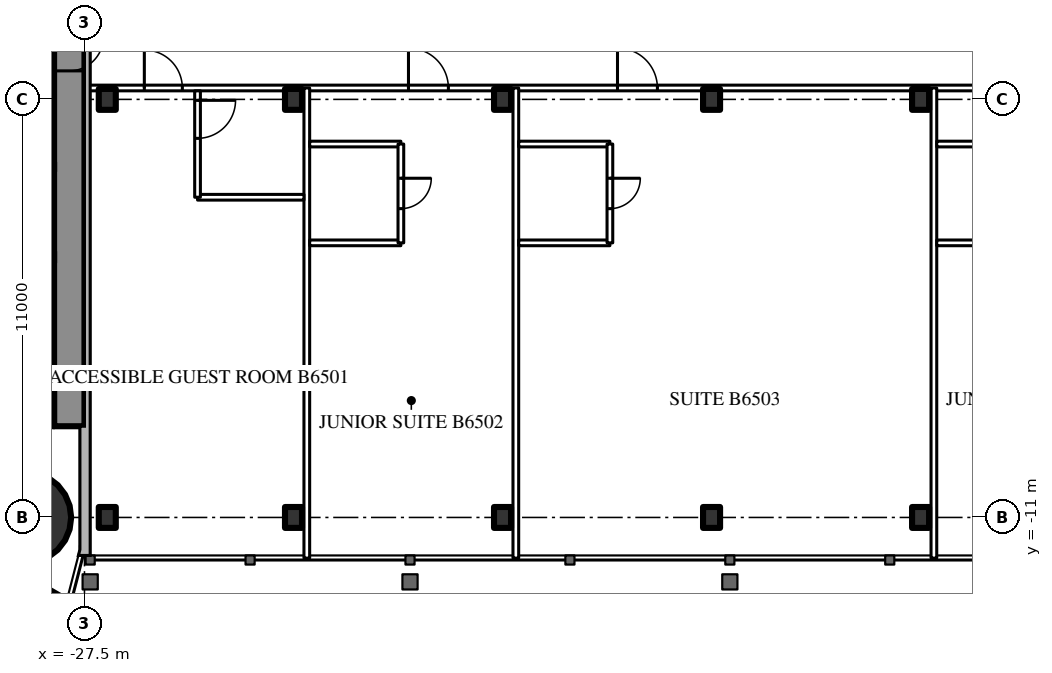
"""IFC4 building model, lengths in metres.
Left out: names, types, materials, properties, quantities, classifications, styles, units other than length and angle.
Written with IfcOpenShell. Run it as: python <this file> out.ifc"""

import sys

from ifc_helpers import new_model, si_unit, direction, frame, frame_2d, origin, origin_2d, place, context, subcontext, project, spatial, rectangle, circle, i_section, extrude, element, fill, save


model = new_model("IFC4")
c1 = context("Model", 3, precision=1e-05, world=origin(), true_north=direction((0.0, 1.0)))
c2 = subcontext(c1, "Body", "Model", "MODEL_VIEW")
j1 = project(units=[si_unit("LENGTHUNIT", "METRE"), si_unit("PLANEANGLEUNIT", "RADIAN")], contexts=[c1])
p1 = place(None, origin())
s1 = spatial("IfcSite", under=j1, at=p1, CompositionType="ELEMENT")
p2 = place(p1, origin())
s2 = spatial("IfcBuilding", under=s1, at=p2, CompositionType="ELEMENT")
p3 = place(p2, frame((0.0, 0.0, 244.1)))
s3 = spatial("IfcBuildingStorey", under=s2, at=p3, CompositionType="ELEMENT", Elevation=244.1)
p4 = place(p3, frame((-29.05, -11.0, 0.0), z_axis=(0.0, 0.0, 1.0), x_axis=(1.0, 0.0, 0.0)))
e1 = element("IfcColumn", 1, at=p4, inside=s3, PredefinedType="COLUMN", context=c2, shape_type="SweptSolid", body=[
    extrude(circle(Radius=1.2, at=origin_2d()), origin(), (0.0, 0.0, 1.0), 3.6),
])
p5 = place(p3, frame((-27.9, 8.6, 0.0), z_axis=(0.0, 0.0, 1.0), x_axis=(0.0, -1.0, 0.0)))
e2 = element("IfcWall", 2, at=p5, inside=s3, PredefinedType="SHEAR", context=c2, shape_type="SweptSolid", body=[
    extrude(rectangle(XDim=17.2, YDim=0.8, at=frame_2d((8.6, 0.0))), origin(), (0.0, 0.0, 1.0), 3.6),
])
p6 = place(p5, frame((6.95, 0.0, 0.0)))
e3 = element("IfcOpeningElement", 3, at=p6, cuts=e2, PredefinedType="OPENING", context=c2, shape_type="SweptSolid", body=[
    extrude(rectangle(XDim=0.9, YDim=2.2, at=frame_2d((0.45, 1.1))), frame((0.0, 0.41, 0.0), z_axis=(0.0, -1.0, 0.0), x_axis=(1.0, 0.0, 0.0)), (0.0, 0.0, 1.0), 0.82),
])
p7 = place(p3, frame((-28.3, -8.0, 0.0), z_axis=(0.0, 0.0, 1.0), x_axis=(-1.0, 0.0, 0.0)))
e4 = element("IfcWall", 4, at=p7, inside=s3, PredefinedType="SHEAR", context=c2, shape_type="SweptSolid", body=[
    extrude(rectangle(XDim=8.4, YDim=1.2, at=frame_2d((4.2, 0.0))), origin(), (0.0, 0.0, 1.0), 3.6),
])
p8 = place(p7, frame((0.25, 0.0, 0.0)))
e5 = element("IfcOpeningElement", 5, at=p8, cuts=e4, PredefinedType="OPENING", context=c2, shape_type="SweptSolid", body=[
    extrude(rectangle(XDim=1.0, YDim=2.2, at=frame_2d((0.5, 1.1))), frame((0.0, 0.61, 0.0), z_axis=(0.0, -1.0, 0.0), x_axis=(1.0, 0.0, 0.0)), (0.0, 0.0, 1.0), 1.22),
])
p9 = place(p3, frame((-28.3, -4.15, 0.0), z_axis=(0.0, 0.0, 1.0), x_axis=(-1.0, 0.0, 0.0)))
e6 = element("IfcWall", 6, at=p9, inside=s3, PredefinedType="SHEAR", context=c2, shape_type="SweptSolid", body=[
    extrude(rectangle(XDim=8.4, YDim=0.3, at=frame_2d((4.2, 0.0))), origin(), (0.0, 0.0, 1.0), 3.6),
])
p10 = place(p3, frame((-28.3, -1.775, 0.0), z_axis=(0.0, 0.0, 1.0), x_axis=(-1.0, 0.0, 0.0)))
e7 = element("IfcWall", 7, at=p10, inside=s3, PredefinedType="SHEAR", context=c2, shape_type="SweptSolid", body=[
    extrude(rectangle(XDim=2.9, YDim=0.25, at=frame_2d((1.45, 0.0))), origin(), (0.0, 0.0, 1.0), 3.6),
])
p11 = place(p3, frame((-27.2, 14.3, 0.0), z_axis=(0.0, 0.0, 1.0), x_axis=(-0.866026593062, -0.499997940104, 0.0)))
e8 = element("IfcWall", 8, at=p11, inside=s3, PredefinedType="SHEAR", context=c2, shape_type="SweptSolid", body=[
    extrude(rectangle(XDim=28.946, YDim=1.2, at=frame_2d((14.473, 0.0))), origin(), (0.0, 0.0, 1.0), 3.6),
])
p12 = place(p11, frame((4.6, 0.0, 0.0)))
e9 = element("IfcOpeningElement", 9, at=p12, cuts=e8, PredefinedType="OPENING", context=c2, shape_type="SweptSolid", body=[
    extrude(rectangle(XDim=1.0, YDim=2.2, at=frame_2d((0.5, 1.1))), frame((0.0, 0.61, 0.0), z_axis=(0.0, -1.0, 0.0), x_axis=(1.0, 0.0, 0.0)), (0.0, 0.0, 1.0), 1.22),
])
p13 = place(p11, frame((13.395, 0.0, 0.0)))
e10 = element("IfcOpeningElement", 10, at=p13, cuts=e8, PredefinedType="OPENING", context=c2, shape_type="SweptSolid", body=[
    extrude(rectangle(XDim=1.8, YDim=2.2, at=frame_2d((0.9, 1.1))), frame((0.0, 0.61, 0.0), z_axis=(0.0, -1.0, 0.0), x_axis=(1.0, 0.0, 0.0)), (0.0, 0.0, 1.0), 1.22),
])
p14 = place(p3, frame((-27.2, -14.3, 0.0), z_axis=(0.0, 0.0, 1.0), x_axis=(-0.866024021859, 0.500002393557, 0.0)))
e11 = element("IfcWall", 11, at=p14, inside=s3, PredefinedType="SHEAR", context=c2, shape_type="SweptSolid", body=[
    extrude(rectangle(XDim=27.907, YDim=1.2, at=frame_2d((13.954, 0.0))), origin(), (0.0, 0.0, 1.0), 3.6),
])
p15 = place(p14, frame((4.6, 0.0, 0.0)))
e12 = element("IfcOpeningElement", 12, at=p15, cuts=e11, PredefinedType="OPENING", context=c2, shape_type="SweptSolid", body=[
    extrude(rectangle(XDim=1.0, YDim=2.2, at=frame_2d((0.5, 1.1))), frame((0.0, 0.61, 0.0), z_axis=(0.0, -1.0, 0.0), x_axis=(1.0, 0.0, 0.0)), (0.0, 0.0, 1.0), 1.22),
])
p16 = place(p14, frame((13.395, 0.0, 0.0)))
e13 = element("IfcOpeningElement", 13, at=p16, cuts=e11, PredefinedType="OPENING", context=c2, shape_type="SweptSolid", body=[
    extrude(rectangle(XDim=1.8, YDim=2.2, at=frame_2d((0.9, 1.1))), frame((0.0, 0.61, 0.0), z_axis=(0.0, -1.0, 0.0), x_axis=(1.0, 0.0, 0.0)), (0.0, 0.0, 1.0), 1.22),
])
for number, where, z_axis, x_axis in (
    (14, (-26.9, -11.0, 0.0), (0.0, 0.0, 1.0), (1.0, 0.0, 0.0)),
    (15, (-22.0, -11.0, 0.0), (0.0, 0.0, 1.0), (1.0, 0.0, 0.0)),
    (16, (-16.5, -11.0, 0.0), (0.0, 0.0, 1.0), (1.0, 0.0, 0.0)),
    (17, (-11.0, -11.0, 0.0), (0.0, 0.0, 1.0), (1.0, 0.0, 0.0)),
    (18, (-5.5, -11.0, 0.0), (0.0, 0.0, 1.0), (1.0, 0.0, 0.0)),
    (19, (-26.9, 0.0, 0.0), (0.0, 0.0, 1.0), (1.0, 0.0, 0.0)),
    (20, (-22.0, 0.0, 0.0), (0.0, 0.0, 1.0), (1.0, 0.0, 0.0)),
    (21, (-16.5, 0.0, 0.0), (0.0, 0.0, 1.0), (1.0, 0.0, 0.0)),
    (22, (-11.0, 0.0, 0.0), (0.0, 0.0, 1.0), (1.0, 0.0, 0.0)),
    (23, (-5.5, 0.0, 0.0), (0.0, 0.0, 1.0), (1.0, 0.0, 0.0)),
):
    element("IfcColumn", number, at=place(p3, frame(where, z_axis=z_axis, x_axis=x_axis)), inside=s3, PredefinedType="COLUMN", context=c2, shape_type="SweptSolid", body=[
        extrude(i_section(OverallWidth=0.448, OverallDepth=0.55, WebThickness=0.072, FlangeThickness=0.115, FilletRadius=0.02, at=origin_2d()), origin(), (0.0, 0.0, 1.0), 3.6),
    ])
p17 = place(p3, frame((-27.5, 0.3, 0.0), z_axis=(0.0, 0.0, 1.0), x_axis=(1.0, 0.0, 0.0)))
e24 = element("IfcWall", 24, at=p17, inside=s3, PredefinedType="PARTITIONING", context=c2, shape_type="SweptSolid", body=[
    extrude(rectangle(XDim=55.0, YDim=0.15, at=frame_2d((27.5, 0.0))), origin(), (0.0, 0.0, 1.0), 2.4),
])
p18 = place(p17, frame((1.575, 0.0, 0.0)))
e25 = element("IfcOpeningElement", 25, at=p18, cuts=e24, PredefinedType="OPENING", context=c2, shape_type="SweptSolid", body=[
    extrude(rectangle(XDim=1.0, YDim=2.2, at=frame_2d((0.5, 1.1))), frame((0.0, 0.085, 0.0), z_axis=(0.0, -1.0, 0.0), x_axis=(1.0, 0.0, 0.0)), (0.0, 0.0, 1.0), 0.17),
])
p19 = place(p17, frame((8.525, 0.0, 0.0)))
e26 = element("IfcOpeningElement", 26, at=p19, cuts=e24, PredefinedType="OPENING", context=c2, shape_type="SweptSolid", body=[
    extrude(rectangle(XDim=1.05, YDim=2.4, at=frame_2d((0.525, 1.2))), frame((0.0, 0.085, 0.0), z_axis=(0.0, -1.0, 0.0), x_axis=(1.0, 0.0, 0.0)), (0.0, 0.0, 1.0), 0.17),
])
p20 = place(p17, frame((14.025, 0.0, 0.0)))
e27 = element("IfcOpeningElement", 27, at=p20, cuts=e24, PredefinedType="OPENING", context=c2, shape_type="SweptSolid", body=[
    extrude(rectangle(XDim=1.05, YDim=2.4, at=frame_2d((0.525, 1.2))), frame((0.0, 0.085, 0.0), z_axis=(0.0, -1.0, 0.0), x_axis=(1.0, 0.0, 0.0)), (0.0, 0.0, 1.0), 0.17),
])
p21 = place(p17, frame((25.025, 0.0, 0.0)))
e28 = element("IfcOpeningElement", 28, at=p21, cuts=e24, PredefinedType="OPENING", context=c2, shape_type="SweptSolid", body=[
    extrude(rectangle(XDim=1.05, YDim=2.4, at=frame_2d((0.525, 1.2))), frame((0.0, 0.085, 0.0), z_axis=(0.0, -1.0, 0.0), x_axis=(1.0, 0.0, 0.0)), (0.0, 0.0, 1.0), 0.17),
])
p22 = place(p17, frame((30.525, 0.0, 0.0)))
e29 = element("IfcOpeningElement", 29, at=p22, cuts=e24, PredefinedType="OPENING", context=c2, shape_type="SweptSolid", body=[
    extrude(rectangle(XDim=1.05, YDim=2.4, at=frame_2d((0.525, 1.2))), frame((0.0, 0.085, 0.0), z_axis=(0.0, -1.0, 0.0), x_axis=(1.0, 0.0, 0.0)), (0.0, 0.0, 1.0), 0.17),
])
p23 = place(p17, frame((41.525, 0.0, 0.0)))
e30 = element("IfcOpeningElement", 30, at=p23, cuts=e24, PredefinedType="OPENING", context=c2, shape_type="SweptSolid", body=[
    extrude(rectangle(XDim=1.05, YDim=2.4, at=frame_2d((0.525, 1.2))), frame((0.0, 0.085, 0.0), z_axis=(0.0, -1.0, 0.0), x_axis=(1.0, 0.0, 0.0)), (0.0, 0.0, 1.0), 0.17),
])
p24 = place(p17, frame((47.025, 0.0, 0.0)))
e31 = element("IfcOpeningElement", 31, at=p24, cuts=e24, PredefinedType="OPENING", context=c2, shape_type="SweptSolid", body=[
    extrude(rectangle(XDim=1.05, YDim=2.4, at=frame_2d((0.525, 1.2))), frame((0.0, 0.085, 0.0), z_axis=(0.0, -1.0, 0.0), x_axis=(1.0, 0.0, 0.0)), (0.0, 0.0, 1.0), 0.17),
])
p25 = place(p17, frame((52.525, 0.0, 0.0)))
e32 = element("IfcOpeningElement", 32, at=p25, cuts=e24, PredefinedType="OPENING", context=c2, shape_type="SweptSolid", body=[
    extrude(rectangle(XDim=1.05, YDim=2.4, at=frame_2d((0.525, 1.2))), frame((0.0, 0.085, 0.0), z_axis=(0.0, -1.0, 0.0), x_axis=(1.0, 0.0, 0.0)), (0.0, 0.0, 1.0), 0.17),
])
for number, where, z_axis, x_axis in (
    (33, (-21.65, -12.07, 0.0), (0.0, 0.0, 1.0), (0.0, 1.0, 0.0)),
    (34, (-16.15, -12.07, 0.0), (0.0, 0.0, 1.0), (0.0, 1.0, 0.0)),
    (35, (-5.15, -12.07, 0.0), (0.0, 0.0, 1.0), (0.0, 1.0, 0.0)),
):
    element("IfcWall", number, at=place(p3, frame(where, z_axis=z_axis, x_axis=x_axis)), inside=s3, PredefinedType="PARTITIONING", context=c2, shape_type="SweptSolid", body=[
        extrude(rectangle(XDim=12.37, YDim=0.15, at=frame_2d((6.185, 0.0))), origin(), (0.0, 0.0, 1.0), 3.4),
    ])
p26 = place(p3, frame((-24.525, -2.575, 0.0), z_axis=(0.0, 0.0, 1.0), x_axis=(1.0, 0.0, 0.0)))
e36 = element("IfcWall", 36, at=p26, inside=s3, PredefinedType="PARTITIONING", context=c2, shape_type="SweptSolid", body=[
    extrude(rectangle(XDim=2.8, YDim=0.15, at=frame_2d((1.4, 0.0))), origin(), (0.0, 0.0, 1.0), 3.4),
])
p27 = place(p3, frame((-24.525, -2.575, 0.0), z_axis=(0.0, 0.0, 1.0), x_axis=(0.0, 1.0, 0.0)))
e37 = element("IfcWall", 37, at=p27, inside=s3, PredefinedType="PARTITIONING", context=c2, shape_type="SweptSolid", body=[
    extrude(rectangle(XDim=2.8, YDim=0.15, at=frame_2d((1.4, 0.0))), origin(), (0.0, 0.0, 1.0), 3.4),
])
p28 = place(p27, frame((1.55, 0.0, 0.0)))
e38 = element("IfcOpeningElement", 38, at=p28, cuts=e37, PredefinedType="OPENING", context=c2, shape_type="SweptSolid", body=[
    extrude(rectangle(XDim=1.0, YDim=2.2, at=frame_2d((0.5, 1.1))), frame((0.0, 0.085, 0.0), z_axis=(0.0, -1.0, 0.0), x_axis=(1.0, 0.0, 0.0)), (0.0, 0.0, 1.0), 0.17),
])
for number, where, z_axis, x_axis in (
    (39, (-21.575, -3.775, 0.0), (0.0, 0.0, 1.0), (1.0, 0.0, 0.0)),
    (40, (-21.575, -1.175, 0.0), (0.0, 0.0, 1.0), (1.0, 0.0, 0.0)),
):
    element("IfcWall", number, at=place(p3, frame(where, z_axis=z_axis, x_axis=x_axis)), inside=s3, PredefinedType="PARTITIONING", context=c2, shape_type="SweptSolid", body=[
        extrude(rectangle(XDim=2.4, YDim=0.15, at=frame_2d((1.2, 0.0))), origin(), (0.0, 0.0, 1.0), 3.4),
    ])
p29 = place(p3, frame((-19.175, -3.775, 0.0), z_axis=(0.0, 0.0, 1.0), x_axis=(0.0, 1.0, 0.0)))
e41 = element("IfcWall", 41, at=p29, inside=s3, PredefinedType="PARTITIONING", context=c2, shape_type="SweptSolid", body=[
    extrude(rectangle(XDim=2.6, YDim=0.15, at=frame_2d((1.3, 0.0))), origin(), (0.0, 0.0, 1.0), 3.4),
])
p30 = place(p29, frame((0.9, 0.0, 0.0)))
e42 = element("IfcOpeningElement", 42, at=p30, cuts=e41, PredefinedType="OPENING", context=c2, shape_type="SweptSolid", body=[
    extrude(rectangle(XDim=0.8, YDim=2.2, at=frame_2d((0.4, 1.1))), frame((0.0, 0.085, 0.0), z_axis=(0.0, -1.0, 0.0), x_axis=(1.0, 0.0, 0.0)), (0.0, 0.0, 1.0), 0.17),
])
for number, where, z_axis, x_axis in (
    (43, (-16.075, -3.775, 0.0), (0.0, 0.0, 1.0), (1.0, 0.0, 0.0)),
    (44, (-16.075, -1.175, 0.0), (0.0, 0.0, 1.0), (1.0, 0.0, 0.0)),
):
    element("IfcWall", number, at=place(p3, frame(where, z_axis=z_axis, x_axis=x_axis)), inside=s3, PredefinedType="PARTITIONING", context=c2, shape_type="SweptSolid", body=[
        extrude(rectangle(XDim=2.4, YDim=0.15, at=frame_2d((1.2, 0.0))), origin(), (0.0, 0.0, 1.0), 3.4),
    ])
p31 = place(p3, frame((-13.675, -3.775, 0.0), z_axis=(0.0, 0.0, 1.0), x_axis=(0.0, 1.0, 0.0)))
e45 = element("IfcWall", 45, at=p31, inside=s3, PredefinedType="PARTITIONING", context=c2, shape_type="SweptSolid", body=[
    extrude(rectangle(XDim=2.6, YDim=0.15, at=frame_2d((1.3, 0.0))), origin(), (0.0, 0.0, 1.0), 3.4),
])
p32 = place(p31, frame((0.9, 0.0, 0.0)))
e46 = element("IfcOpeningElement", 46, at=p32, cuts=e45, PredefinedType="OPENING", context=c2, shape_type="SweptSolid", body=[
    extrude(rectangle(XDim=0.8, YDim=2.2, at=frame_2d((0.4, 1.1))), frame((0.0, 0.085, 0.0), z_axis=(0.0, -1.0, 0.0), x_axis=(1.0, 0.0, 0.0)), (0.0, 0.0, 1.0), 0.17),
])
for number, where, z_axis, x_axis in (
    (47, (-5.075, -3.775, 0.0), (0.0, 0.0, 1.0), (1.0, 0.0, 0.0)),
    (48, (-5.075, -1.175, 0.0), (0.0, 0.0, 1.0), (1.0, 0.0, 0.0)),
):
    element("IfcWall", number, at=place(p3, frame(where, z_axis=z_axis, x_axis=x_axis)), inside=s3, PredefinedType="PARTITIONING", context=c2, shape_type="SweptSolid", body=[
        extrude(rectangle(XDim=2.4, YDim=0.15, at=frame_2d((1.2, 0.0))), origin(), (0.0, 0.0, 1.0), 3.4),
    ])
p33 = place(p6, origin())
e49 = element("IfcDoor", 49, at=p33, inside=s3, OperationType="SINGLE_SWING_LEFT", PredefinedType="DOOR", context=c2, shape_type="SweptSolid", body=[
    extrude(rectangle(XDim=0.9, YDim=2.2, at=frame_2d((0.45, 1.1))), frame((0.0, 0.025, 0.0), z_axis=(0.0, -1.0, 0.0), x_axis=(1.0, 0.0, 0.0)), (0.0, 0.0, 1.0), 0.05),
])
fill(e3, e49)
p34 = place(p28, origin())
e50 = element("IfcDoor", 50, at=p34, inside=s3, OperationType="SINGLE_SWING_RIGHT", PredefinedType="DOOR", context=c2, shape_type="SweptSolid", body=[
    extrude(rectangle(XDim=1.0, YDim=2.2, at=frame_2d((0.5, 1.1))), frame((0.0, 0.025, 0.0), z_axis=(0.0, -1.0, 0.0), x_axis=(1.0, 0.0, 0.0)), (0.0, 0.0, 1.0), 0.05),
])
fill(e38, e50)
p35 = place(p18, origin())
e51 = element("IfcDoor", 51, at=p35, inside=s3, OperationType="SINGLE_SWING_LEFT", PredefinedType="DOOR", context=c2, shape_type="SweptSolid", body=[
    extrude(rectangle(XDim=1.0, YDim=2.2, at=frame_2d((0.5, 1.1))), frame((0.0, 0.025, 0.0), z_axis=(0.0, -1.0, 0.0), x_axis=(1.0, 0.0, 0.0)), (0.0, 0.0, 1.0), 0.05),
])
fill(e25, e51)
p36 = place(p30, origin())
e52 = element("IfcDoor", 52, at=p36, inside=s3, OperationType="SINGLE_SWING_RIGHT", PredefinedType="DOOR", context=c2, shape_type="SweptSolid", body=[
    extrude(rectangle(XDim=0.8, YDim=2.2, at=frame_2d((0.4, 1.1))), frame((0.0, 0.025, 0.0), z_axis=(0.0, -1.0, 0.0), x_axis=(1.0, 0.0, 0.0)), (0.0, 0.0, 1.0), 0.05),
])
fill(e42, e52)
p37 = place(p19, origin())
e53 = element("IfcDoor", 53, at=p37, inside=s3, OperationType="SINGLE_SWING_LEFT", PredefinedType="DOOR", context=c2, shape_type="SweptSolid", body=[
    extrude(rectangle(XDim=1.05, YDim=2.4, at=frame_2d((0.525, 1.2))), frame((0.0, 0.025, 0.0), z_axis=(0.0, -1.0, 0.0), x_axis=(1.0, 0.0, 0.0)), (0.0, 0.0, 1.0), 0.05),
])
fill(e26, e53)
p38 = place(p32, origin())
e54 = element("IfcDoor", 54, at=p38, inside=s3, OperationType="SINGLE_SWING_RIGHT", PredefinedType="DOOR", context=c2, shape_type="SweptSolid", body=[
    extrude(rectangle(XDim=0.8, YDim=2.2, at=frame_2d((0.4, 1.1))), frame((0.0, 0.025, 0.0), z_axis=(0.0, -1.0, 0.0), x_axis=(1.0, 0.0, 0.0)), (0.0, 0.0, 1.0), 0.05),
])
fill(e46, e54)
p39 = place(p20, origin())
e55 = element("IfcDoor", 55, at=p39, inside=s3, OperationType="SINGLE_SWING_LEFT", PredefinedType="DOOR", context=c2, shape_type="SweptSolid", body=[
    extrude(rectangle(XDim=1.05, YDim=2.4, at=frame_2d((0.525, 1.2))), frame((0.0, 0.025, 0.0), z_axis=(0.0, -1.0, 0.0), x_axis=(1.0, 0.0, 0.0)), (0.0, 0.0, 1.0), 0.05),
])
fill(e27, e55)
save(model, sys.argv[1])
